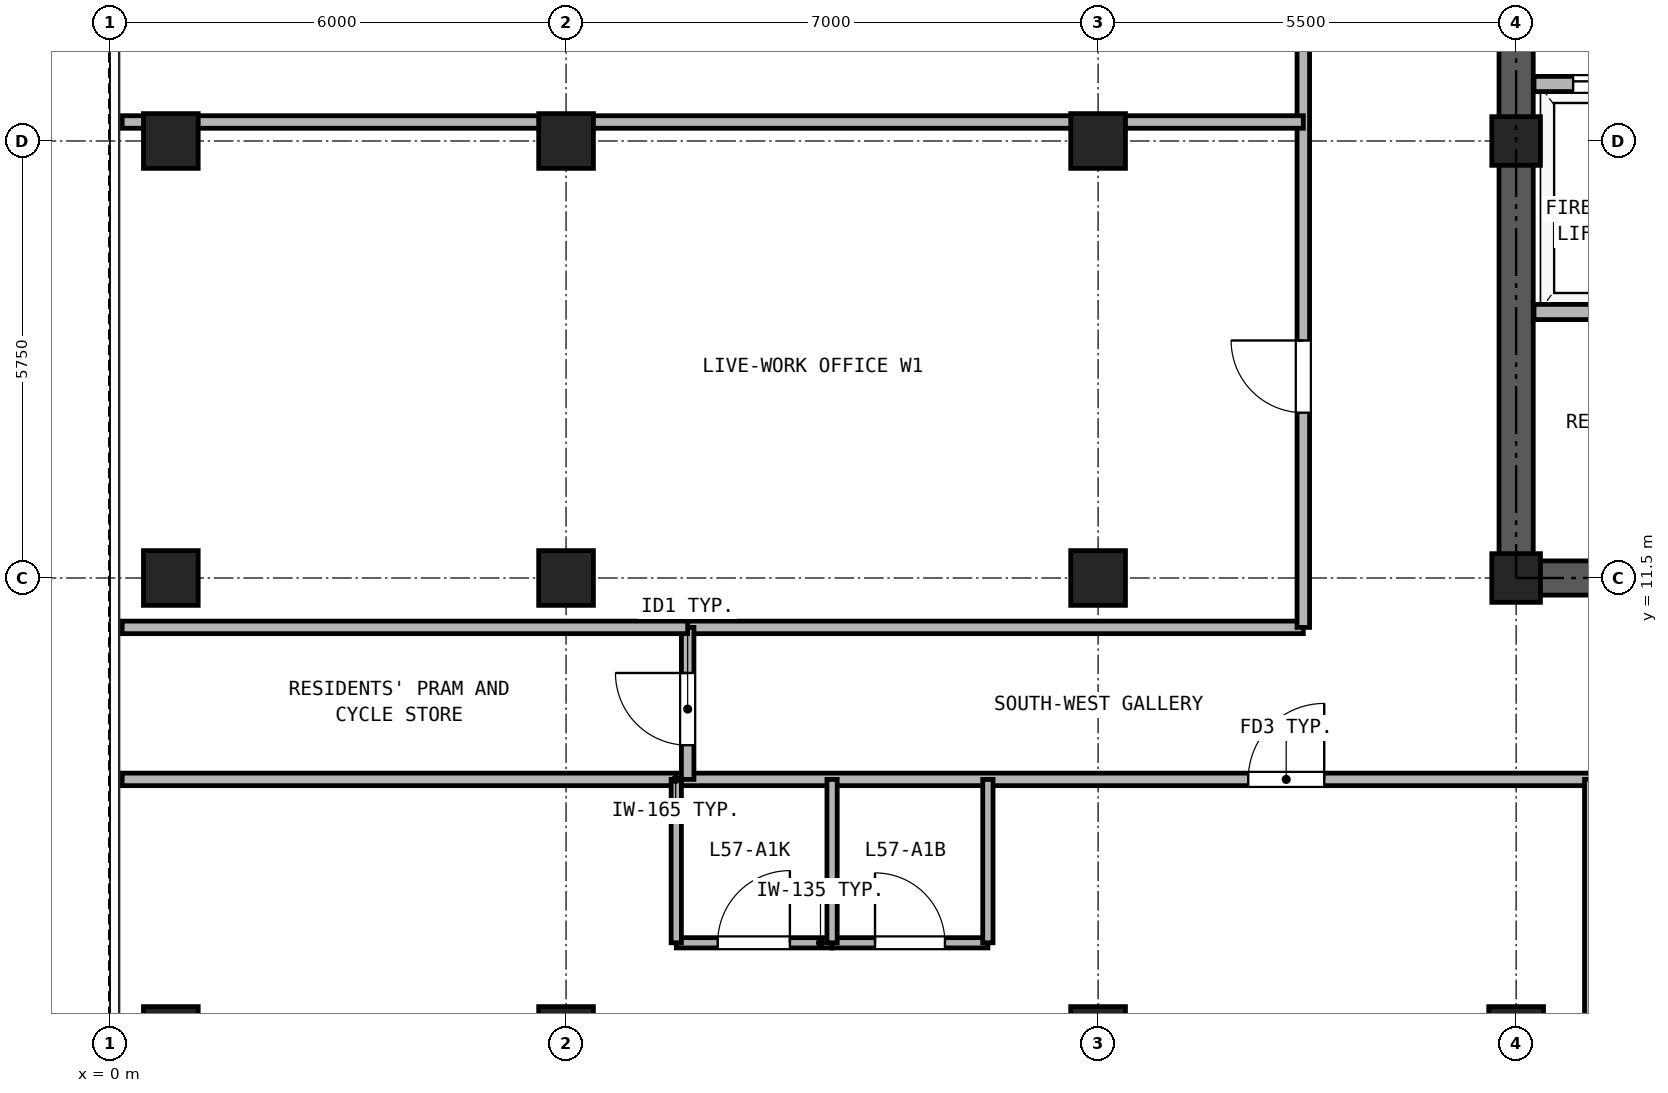
"""IFC4 building model, lengths in metres.
Left out: names, types, materials, properties, quantities, classifications, styles, units other than length and angle.
Written with IfcOpenShell. Run it as: python <this file> out.ifc"""

import sys

from ifc_helpers import new_model, si_unit, direction, frame, frame_2d, origin, origin_2d, place, context, subcontext, project, spatial, rectangle, hollow_rectangle, extrude, source, transform, mapped, element, fill, save


model = new_model("IFC4")
c1 = context("Model", 3, precision=1e-05, world=origin(), true_north=direction((0.0, 1.0)))
c2 = subcontext(c1, "Body", "Model", "MODEL_VIEW")
j1 = project(units=[si_unit("LENGTHUNIT", "METRE"), si_unit("PLANEANGLEUNIT", "RADIAN")], contexts=[c1])
p1 = place(None, origin())
s1 = spatial("IfcSite", under=j1, at=p1, CompositionType="ELEMENT")
p2 = place(p1, origin())
s2 = spatial("IfcBuilding", under=s1, at=p2, CompositionType="ELEMENT")
p3 = place(p2, frame((0.0, 0.0, 202.8)))
s3 = spatial("IfcBuildingStorey", under=s2, at=p3, CompositionType="ELEMENT", Elevation=202.8)
m1 = source(origin(), c2, "Body", "SweptSolid", [
    extrude(hollow_rectangle(XDim=0.72, YDim=0.72, WallThickness=0.04, at=origin_2d()), origin(), (0.0, 0.0, 1.0), 2.95),
])
for number, where, z_axis, x_axis in (
    (1, (0.8, 5.5, 0.0), (0.0, 0.0, 1.0), (1.0, 0.0, 0.0)),
    (2, (0.8, 11.5, 0.0), (0.0, 0.0, 1.0), (1.0, 0.0, 0.0)),
    (3, (0.8, 17.25, 0.0), (0.0, 0.0, 1.0), (1.0, 0.0, 0.0)),
    (4, (6.0, 5.5, 0.0), (0.0, 0.0, 1.0), (1.0, 0.0, 0.0)),
    (5, (6.0, 11.5, 0.0), (0.0, 0.0, 1.0), (1.0, 0.0, 0.0)),
    (6, (6.0, 17.25, 0.0), (0.0, 0.0, 1.0), (1.0, 0.0, 0.0)),
    (7, (13.0, 5.5, 0.0), (0.0, 0.0, 1.0), (1.0, 0.0, 0.0)),
    (8, (13.0, 11.5, 0.0), (0.0, 0.0, 1.0), (1.0, 0.0, 0.0)),
    (9, (13.0, 17.25, 0.0), (0.0, 0.0, 1.0), (1.0, 0.0, 0.0)),
    (10, (18.5, 5.5, 0.0), (0.0, 0.0, 1.0), (1.0, 0.0, 0.0)),
):
    element("IfcColumn", number, at=place(p3, frame(where, z_axis=z_axis, x_axis=x_axis)), inside=s3, PredefinedType="COLUMN", context=c2, shape_type="MappedRepresentation", body=[
        mapped(m1, transform((0.0, 0.0, 0.0), x_axis=(1.0, 0.0, 0.0), y_axis=(0.0, 1.0, 0.0), z_axis=(0.0, 0.0, 1.0), scale=1.0)),
    ])
m2 = source(origin(), c2, "Body", "SweptSolid", [
    extrude(hollow_rectangle(XDim=0.64, YDim=0.64, WallThickness=0.035, at=origin_2d()), origin(), (0.0, 0.0, 1.0), 2.95),
])
for number, where, z_axis, x_axis in (
    (11, (18.5, 11.5, 0.0), (0.0, 0.0, 1.0), (1.0, 0.0, 0.0)),
    (12, (18.5, 17.25, 0.0), (0.0, 0.0, 1.0), (1.0, 0.0, 0.0)),
):
    element("IfcColumn", number, at=place(p3, frame(where, z_axis=z_axis, x_axis=x_axis)), inside=s3, PredefinedType="COLUMN", context=c2, shape_type="MappedRepresentation", body=[
        mapped(m2, transform((0.0, 0.0, 0.0), x_axis=(1.0, 0.0, 0.0), y_axis=(0.0, 1.0, 0.0), z_axis=(0.0, 0.0, 1.0), scale=1.0)),
    ])
p4 = place(p3, frame((18.275, 11.5, 0.0), z_axis=(0.0, 0.0, 1.0), x_axis=(1.0, 0.0, 0.0)))
e13 = element("IfcWall", 13, at=p4, inside=s3, PredefinedType="SHEAR", context=c2, shape_type="SweptSolid", body=[
    extrude(rectangle(XDim=10.45, YDim=0.45, at=frame_2d((5.225, 0.0))), origin(), (0.0, 0.0, 1.0), 2.95),
])
p5 = place(p4, frame((1.825, 0.0, 0.0)))
e14 = element("IfcOpeningElement", 14, at=p5, cuts=e13, PredefinedType="OPENING", context=c2, shape_type="SweptSolid", body=[
    extrude(rectangle(XDim=0.95, YDim=2.15, at=frame_2d((0.475, 1.075))), frame((0.0, 0.235, 0.0), z_axis=(0.0, -1.0, 0.0), x_axis=(1.0, 0.0, 0.0)), (0.0, 0.0, 1.0), 0.47),
])
p6 = place(p4, frame((5.325, 0.0, 0.0)))
e15 = element("IfcOpeningElement", 15, at=p6, cuts=e13, PredefinedType="OPENING", context=c2, shape_type="SweptSolid", body=[
    extrude(rectangle(XDim=0.95, YDim=2.15, at=frame_2d((0.475, 1.075))), frame((0.0, 0.235, 0.0), z_axis=(0.0, -1.0, 0.0), x_axis=(1.0, 0.0, 0.0)), (0.0, 0.0, 1.0), 0.47),
])
p7 = place(p4, frame((8.225, 0.0, 0.0)))
e16 = element("IfcOpeningElement", 16, at=p7, cuts=e13, PredefinedType="OPENING", context=c2, shape_type="SweptSolid", body=[
    extrude(rectangle(XDim=1.1, YDim=2.25, at=frame_2d((0.55, 1.125))), frame((0.0, 0.235, 0.0), z_axis=(0.0, -1.0, 0.0), x_axis=(1.0, 0.0, 0.0)), (0.0, 0.0, 1.0), 0.47),
])
p8 = place(p3, frame((18.5, 11.725, 0.0), z_axis=(0.0, 0.0, 1.0), x_axis=(0.0, 1.0, 0.0)))
e17 = element("IfcWall", 17, at=p8, inside=s3, PredefinedType="SHEAR", context=c2, shape_type="SweptSolid", body=[
    extrude(rectangle(XDim=16.8, YDim=0.45, at=frame_2d((8.4, 0.0))), origin(), (0.0, 0.0, 1.0), 2.95),
])
p9 = place(p8, frame((7.425, 0.0, 0.0)))
e18 = element("IfcOpeningElement", 18, at=p9, cuts=e17, PredefinedType="OPENING", context=c2, shape_type="SweptSolid", body=[
    extrude(rectangle(XDim=1.15, YDim=2.2, at=frame_2d((0.575, 1.1))), frame((0.0, 0.235, 0.0), z_axis=(0.0, -1.0, 0.0), x_axis=(1.0, 0.0, 0.0)), (0.0, 0.0, 1.0), 0.47),
])
p10 = place(p3, frame((18.735, 18.0, 0.0), z_axis=(0.0, 0.0, 1.0), x_axis=(1.0, 0.0, 0.0)))
e19 = element("IfcWall", 19, at=p10, inside=s3, PredefinedType="PARTITIONING", context=c2, shape_type="SweptSolid", body=[
    extrude(rectangle(XDim=9.53, YDim=0.2, at=frame_2d((4.765, 0.0))), origin(), (0.0, 0.0, 1.0), 2.95),
])
p11 = place(p10, frame((0.515, 0.0, 0.0)))
e20 = element("IfcOpeningElement", 20, at=p11, cuts=e19, PredefinedType="OPENING", context=c2, shape_type="SweptSolid", body=[
    extrude(rectangle(XDim=1.3, YDim=2.3, at=frame_2d((0.65, 1.15))), frame((0.0, 0.11, 0.0), z_axis=(0.0, -1.0, 0.0), x_axis=(1.0, 0.0, 0.0)), (0.0, 0.0, 1.0), 0.22),
])
p12 = place(p10, frame((2.615, 0.0, 0.0)))
e21 = element("IfcOpeningElement", 21, at=p12, cuts=e19, PredefinedType="OPENING", context=c2, shape_type="SweptSolid", body=[
    extrude(rectangle(XDim=1.3, YDim=2.3, at=frame_2d((0.65, 1.15))), frame((0.0, 0.11, 0.0), z_axis=(0.0, -1.0, 0.0), x_axis=(1.0, 0.0, 0.0)), (0.0, 0.0, 1.0), 0.22),
])
p13 = place(p10, frame((7.115, 0.0, 0.0)))
e22 = element("IfcOpeningElement", 22, at=p13, cuts=e19, PredefinedType="OPENING", context=c2, shape_type="SweptSolid", body=[
    extrude(rectangle(XDim=1.0, YDim=2.15, at=frame_2d((0.5, 1.075))), frame((0.0, 0.11, 0.0), z_axis=(0.0, -1.0, 0.0), x_axis=(1.0, 0.0, 0.0)), (0.0, 0.0, 1.0), 0.22),
])
p14 = place(p3, frame((18.735, 15.0, 0.0), z_axis=(0.0, 0.0, 1.0), x_axis=(1.0, 0.0, 0.0)))
e23 = element("IfcWall", 23, at=p14, inside=s3, PredefinedType="PARTITIONING", context=c2, shape_type="SweptSolid", body=[
    extrude(rectangle(XDim=9.53, YDim=0.2, at=frame_2d((4.765, 0.0))), origin(), (0.0, 0.0, 1.0), 2.95),
])
p15 = place(p3, frame((0.16, 8.85, 0.0), z_axis=(0.0, 0.0, 1.0), x_axis=(1.0, 0.0, 0.0)))
e24 = element("IfcWall", 24, at=p15, inside=s3, PredefinedType="PARTITIONING", context=c2, shape_type="SweptSolid", body=[
    extrude(rectangle(XDim=41.48, YDim=0.165, at=frame_2d((20.74, 0.0))), origin(), (0.0, 0.0, 1.0), 2.95),
])
p16 = place(p15, frame((14.815, 0.0, 0.0)))
e25 = element("IfcOpeningElement", 25, at=p16, cuts=e24, PredefinedType="OPENING", context=c2, shape_type="SweptSolid", body=[
    extrude(rectangle(XDim=1.0, YDim=2.15, at=frame_2d((0.5, 1.075))), frame((0.0, 0.093, 0.0), z_axis=(0.0, -1.0, 0.0), x_axis=(1.0, 0.0, 0.0)), (0.0, 0.0, 1.0), 0.185),
])
p17 = place(p15, frame((28.315, 0.0, 0.0)))
e26 = element("IfcOpeningElement", 26, at=p17, cuts=e24, PredefinedType="OPENING", context=c2, shape_type="SweptSolid", body=[
    extrude(rectangle(XDim=1.0, YDim=2.15, at=frame_2d((0.5, 1.075))), frame((0.0, 0.093, 0.0), z_axis=(0.0, -1.0, 0.0), x_axis=(1.0, 0.0, 0.0)), (0.0, 0.0, 1.0), 0.185),
])
p18 = place(p15, frame((32.615, 0.0, 0.0)))
e27 = element("IfcOpeningElement", 27, at=p18, cuts=e24, PredefinedType="OPENING", context=c2, shape_type="SweptSolid", body=[
    extrude(rectangle(XDim=1.0, YDim=2.15, at=frame_2d((0.5, 1.075))), frame((0.0, 0.093, 0.0), z_axis=(0.0, -1.0, 0.0), x_axis=(1.0, 0.0, 0.0)), (0.0, 0.0, 1.0), 0.185),
])
p19 = place(p3, frame((7.6, 10.85, 0.0), z_axis=(0.0, 0.0, 1.0), x_axis=(1.0, 0.0, 0.0)))
e28 = element("IfcWall", 28, at=p19, inside=s3, PredefinedType="PARTITIONING", context=c2, shape_type="SweptSolid", body=[
    extrude(rectangle(XDim=8.1, YDim=0.165, at=frame_2d((4.05, 0.0))), origin(), (0.0, 0.0, 1.0), 2.95),
])
p20 = place(p3, frame((7.6, 8.85, 0.0), z_axis=(0.0, 0.0, 1.0), x_axis=(0.0, 1.0, 0.0)))
e29 = element("IfcWall", 29, at=p20, inside=s3, PredefinedType="PARTITIONING", context=c2, shape_type="SweptSolid", body=[
    extrude(rectangle(XDim=2.0, YDim=0.165, at=frame_2d((1.0, 0.0))), origin(), (0.0, 0.0, 1.0), 2.95),
])
p21 = place(p20, frame((0.45, 0.0, 0.0)))
e30 = element("IfcOpeningElement", 30, at=p21, cuts=e29, PredefinedType="OPENING", context=c2, shape_type="SweptSolid", body=[
    extrude(rectangle(XDim=0.95, YDim=2.15, at=frame_2d((0.475, 1.075))), frame((0.0, 0.093, 0.0), z_axis=(0.0, -1.0, 0.0), x_axis=(1.0, 0.0, 0.0)), (0.0, 0.0, 1.0), 0.185),
])
p22 = place(p3, frame((15.7, 10.85, 0.0), z_axis=(0.0, 0.0, 1.0), x_axis=(0.0, 1.0, 0.0)))
e31 = element("IfcWall", 31, at=p22, inside=s3, PredefinedType="PARTITIONING", context=c2, shape_type="SweptSolid", body=[
    extrude(rectangle(XDim=24.29, YDim=0.165, at=frame_2d((12.145, 0.0))), origin(), (0.0, 0.0, 1.0), 2.95),
])
p23 = place(p22, frame((2.825, 0.0, 0.0)))
e32 = element("IfcOpeningElement", 32, at=p23, cuts=e31, PredefinedType="OPENING", context=c2, shape_type="SweptSolid", body=[
    extrude(rectangle(XDim=0.95, YDim=2.15, at=frame_2d((0.475, 1.075))), frame((0.0, 0.093, 0.0), z_axis=(0.0, -1.0, 0.0), x_axis=(1.0, 0.0, 0.0)), (0.0, 0.0, 1.0), 0.185),
])
p24 = place(p22, frame((9.15, 0.0, 0.0)))
e33 = element("IfcOpeningElement", 33, at=p24, cuts=e31, PredefinedType="OPENING", context=c2, shape_type="SweptSolid", body=[
    extrude(rectangle(XDim=0.95, YDim=2.15, at=frame_2d((0.475, 1.075))), frame((0.0, 0.093, 0.0), z_axis=(0.0, -1.0, 0.0), x_axis=(1.0, 0.0, 0.0)), (0.0, 0.0, 1.0), 0.185),
])
p25 = place(p22, frame((15.15, 0.0, 0.0)))
e34 = element("IfcOpeningElement", 34, at=p25, cuts=e31, PredefinedType="OPENING", context=c2, shape_type="SweptSolid", body=[
    extrude(rectangle(XDim=0.95, YDim=2.15, at=frame_2d((0.475, 1.075))), frame((0.0, 0.093, 0.0), z_axis=(0.0, -1.0, 0.0), x_axis=(1.0, 0.0, 0.0)), (0.0, 0.0, 1.0), 0.185),
])
p26 = place(p22, frame((20.97, 0.0, 0.0)))
e35 = element("IfcOpeningElement", 35, at=p26, cuts=e31, PredefinedType="OPENING", context=c2, shape_type="SweptSolid", body=[
    extrude(rectangle(XDim=0.95, YDim=2.15, at=frame_2d((0.475, 1.075))), frame((0.0, 0.093, 0.0), z_axis=(0.0, -1.0, 0.0), x_axis=(1.0, 0.0, 0.0)), (0.0, 0.0, 1.0), 0.185),
])
p27 = place(p3, frame((7.45, 6.7, 0.0), z_axis=(0.0, 0.0, 1.0), x_axis=(1.0, 0.0, 0.0)))
e36 = element("IfcWall", 36, at=p27, inside=s3, PredefinedType="PARTITIONING", context=c2, shape_type="SweptSolid", body=[
    extrude(rectangle(XDim=2.05, YDim=0.135, at=frame_2d((1.025, 0.0))), origin(), (0.0, 0.0, 1.0), 2.95),
])
p28 = place(p27, frame((0.545, 0.0, 0.0)))
e37 = element("IfcOpeningElement", 37, at=p28, cuts=e36, PredefinedType="OPENING", context=c2, shape_type="SweptSolid", body=[
    extrude(rectangle(XDim=0.95, YDim=2.15, at=frame_2d((0.475, 1.075))), frame((0.0, 0.077, 0.0), z_axis=(0.0, -1.0, 0.0), x_axis=(1.0, 0.0, 0.0)), (0.0, 0.0, 1.0), 0.155),
])
p29 = place(p3, frame((9.5, 6.7, 0.0), z_axis=(0.0, 0.0, 1.0), x_axis=(1.0, 0.0, 0.0)))
e38 = element("IfcWall", 38, at=p29, inside=s3, PredefinedType="PARTITIONING", context=c2, shape_type="SweptSolid", body=[
    extrude(rectangle(XDim=2.05, YDim=0.135, at=frame_2d((1.025, 0.0))), origin(), (0.0, 0.0, 1.0), 2.95),
])
p30 = place(p29, frame((0.565, 0.0, 0.0)))
e39 = element("IfcOpeningElement", 39, at=p30, cuts=e38, PredefinedType="OPENING", context=c2, shape_type="SweptSolid", body=[
    extrude(rectangle(XDim=0.92, YDim=2.1, at=frame_2d((0.46, 1.05))), frame((0.0, 0.077, 0.0), z_axis=(0.0, -1.0, 0.0), x_axis=(1.0, 0.0, 0.0)), (0.0, 0.0, 1.0), 0.155),
])
for number, where, z_axis, x_axis in (
    (40, (7.45, 6.7, 0.0), (0.0, 0.0, 1.0), (0.0, 1.0, 0.0)),
    (41, (9.5, 6.7, 0.0), (0.0, 0.0, 1.0), (0.0, 1.0, 0.0)),
    (42, (11.55, 6.7, 0.0), (0.0, 0.0, 1.0), (0.0, 1.0, 0.0)),
):
    element("IfcWall", number, at=place(p3, frame(where, z_axis=z_axis, x_axis=x_axis)), inside=s3, PredefinedType="PARTITIONING", context=c2, shape_type="SweptSolid", body=[
        extrude(rectangle(XDim=2.15, YDim=0.135, at=frame_2d((1.075, 0.0))), origin(), (0.0, 0.0, 1.0), 2.95),
    ])
p31 = place(p3, frame((19.5, 0.16, 0.0), z_axis=(0.0, 0.0, 1.0), x_axis=(0.0, 1.0, 0.0)))
e43 = element("IfcWall", 43, at=p31, inside=s3, PredefinedType="PARTITIONING", context=c2, shape_type="SweptSolid", body=[
    extrude(rectangle(XDim=8.69, YDim=0.2, at=frame_2d((4.345, 0.0))), origin(), (0.0, 0.0, 1.0), 2.95),
])
p32 = place(p3, frame((0.16, 10.85, 0.0), z_axis=(0.0, 0.0, 1.0), x_axis=(1.0, 0.0, 0.0)))
e44 = element("IfcWall", 44, at=p32, inside=s3, PredefinedType="PARTITIONING", context=c2, shape_type="SweptSolid", body=[
    extrude(rectangle(XDim=7.44, YDim=0.165, at=frame_2d((3.72, 0.0))), origin(), (0.0, 0.0, 1.0), 2.95),
])
p33 = place(p3, frame((0.16, 17.5, 0.0), z_axis=(0.0, 0.0, 1.0), x_axis=(1.0, 0.0, 0.0)))
e45 = element("IfcWall", 45, at=p33, inside=s3, PredefinedType="PARTITIONING", context=c2, shape_type="SweptSolid", body=[
    extrude(rectangle(XDim=15.54, YDim=0.165, at=frame_2d((7.77, 0.0))), origin(), (0.0, 0.0, 1.0), 2.323),
])
p34 = place(p11, origin())
e46 = element("IfcDoor", 46, at=p34, inside=s3, OperationType="DOUBLE_DOOR_SLIDING", PredefinedType="DOOR", context=c2, shape_type="SweptSolid", body=[
    extrude(rectangle(XDim=1.3, YDim=2.3, at=frame_2d((0.65, 1.15))), frame((0.0, 0.025, 0.0), z_axis=(0.0, -1.0, 0.0), x_axis=(1.0, 0.0, 0.0)), (0.0, 0.0, 1.0), 0.05),
])
fill(e20, e46)
p35 = place(p28, origin())
e47 = element("IfcDoor", 47, at=p35, inside=s3, OperationType="SINGLE_SWING_RIGHT", PredefinedType="DOOR", context=c2, shape_type="SweptSolid", body=[
    extrude(rectangle(XDim=0.95, YDim=2.15, at=frame_2d((0.475, 1.075))), frame((0.0, 0.025, 0.0), z_axis=(0.0, -1.0, 0.0), x_axis=(1.0, 0.0, 0.0)), (0.0, 0.0, 1.0), 0.05),
])
fill(e37, e47)
p36 = place(p30, origin())
e48 = element("IfcDoor", 48, at=p36, inside=s3, OperationType="SINGLE_SWING_LEFT", PredefinedType="DOOR", context=c2, shape_type="SweptSolid", body=[
    extrude(rectangle(XDim=0.92, YDim=2.1, at=frame_2d((0.46, 1.05))), frame((0.0, 0.025, 0.0), z_axis=(0.0, -1.0, 0.0), x_axis=(1.0, 0.0, 0.0)), (0.0, 0.0, 1.0), 0.05),
])
fill(e39, e48)
p37 = place(p16, frame((1.0, 0.0, 0.0), z_axis=(0.0, 0.0, 1.0), x_axis=(-1.0, 0.0, 0.0)))
e49 = element("IfcDoor", 49, at=p37, inside=s3, OperationType="SINGLE_SWING_RIGHT", PredefinedType="DOOR", context=c2, shape_type="SweptSolid", body=[
    extrude(rectangle(XDim=1.0, YDim=2.15, at=frame_2d((0.5, 1.075))), frame((0.0, 0.025, 0.0), z_axis=(0.0, -1.0, 0.0), x_axis=(1.0, 0.0, 0.0)), (0.0, 0.0, 1.0), 0.05),
])
fill(e25, e49)
p38 = place(p21, frame((0.95, 0.0, 0.0), z_axis=(0.0, 0.0, 1.0), x_axis=(-1.0, 0.0, 0.0)))
e50 = element("IfcDoor", 50, at=p38, inside=s3, OperationType="SINGLE_SWING_RIGHT", PredefinedType="DOOR", context=c2, shape_type="SweptSolid", body=[
    extrude(rectangle(XDim=0.95, YDim=2.15, at=frame_2d((0.475, 1.075))), frame((0.0, 0.025, 0.0), z_axis=(0.0, -1.0, 0.0), x_axis=(1.0, 0.0, 0.0)), (0.0, 0.0, 1.0), 0.05),
])
fill(e30, e50)
p39 = place(p23, frame((0.95, 0.0, 0.0), z_axis=(0.0, 0.0, 1.0), x_axis=(-1.0, 0.0, 0.0)))
e51 = element("IfcDoor", 51, at=p39, inside=s3, OperationType="SINGLE_SWING_RIGHT", PredefinedType="DOOR", context=c2, shape_type="SweptSolid", body=[
    extrude(rectangle(XDim=0.95, YDim=2.15, at=frame_2d((0.475, 1.075))), frame((0.0, 0.025, 0.0), z_axis=(0.0, -1.0, 0.0), x_axis=(1.0, 0.0, 0.0)), (0.0, 0.0, 1.0), 0.05),
])
fill(e32, e51)
save(model, sys.argv[1])
